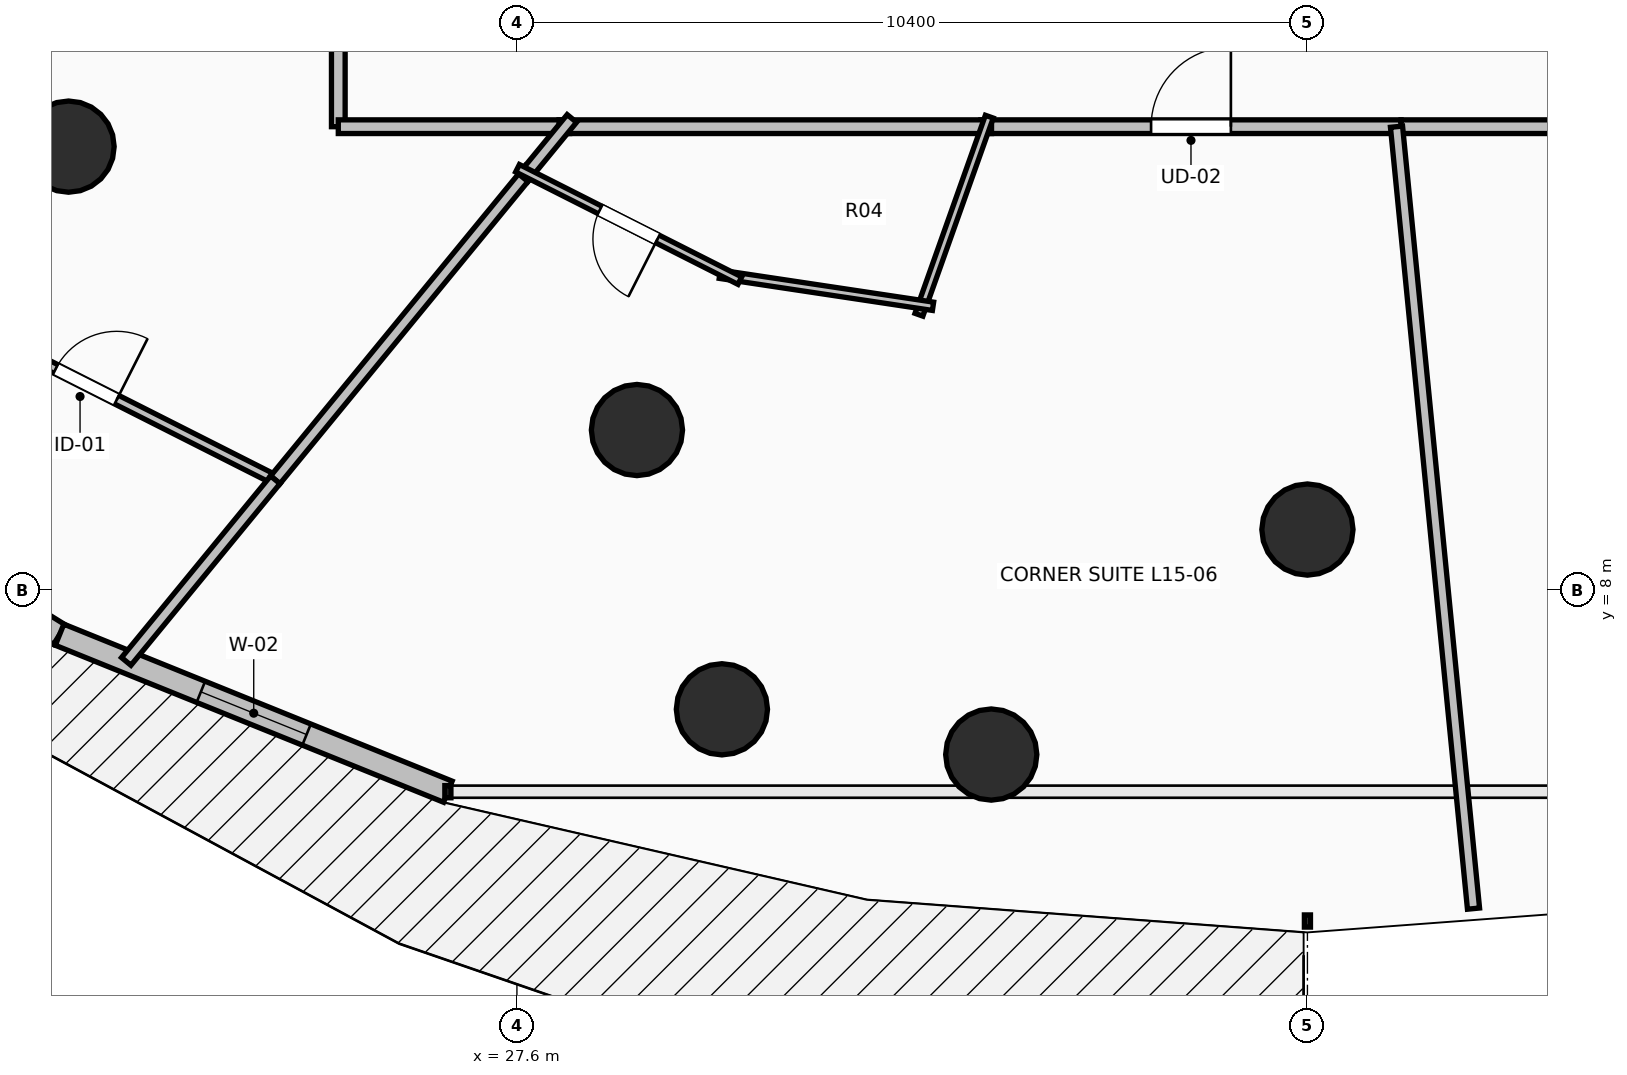
"""IFC4 building model, lengths in metres.
Left out: names, types, materials, properties, quantities, classifications, styles, units other than length and angle.
Written with IfcOpenShell. Run it as: python <this file> out.ifc"""

import sys

from ifc_helpers import new_model, si_unit, direction, frame, frame_2d, origin, origin_2d, place, context, subcontext, project, spatial, rectangle, circle, extrude, element, fill, save


model = new_model("IFC4")
c1 = context("Model", 3, precision=1e-05, world=origin(), true_north=direction((0.0, 1.0)))
c2 = subcontext(c1, "Body", "Model", "MODEL_VIEW")
j1 = project(units=[si_unit("LENGTHUNIT", "METRE"), si_unit("PLANEANGLEUNIT", "RADIAN")], contexts=[c1])
p1 = place(None, origin())
s1 = spatial("IfcSite", under=j1, at=p1, CompositionType="ELEMENT")
p2 = place(p1, origin())
s2 = spatial("IfcBuilding", under=s1, at=p2, CompositionType="ELEMENT")
p3 = place(p2, frame((0.0, 0.0, 59.0)))
s3 = spatial("IfcBuildingStorey", under=s2, at=p3, CompositionType="ELEMENT", Elevation=59.0)
for number, where, z_axis, x_axis in (
    (1, (21.701, 13.838, 0.0), (0.0, 0.0, 1.0), (-0.707, -0.707, 0.0)),
    (2, (29.179, 10.109, 0.0), (0.0, 0.0, 1.0), (-0.383, -0.924, 0.0)),
    (3, (38.0, 8.8, 0.0), (0.0, 0.0, 1.0), (0.0, -1.0, 0.0)),
    (4, (30.297, 6.435, 0.0), (0.0, 0.0, 1.0), (-0.383, -0.924, 0.0)),
    (5, (33.84, 5.84, 0.0), (0.0, 0.0, 1.0), (0.0, -1.0, 0.0)),
):
    element("IfcColumn", number, at=place(p3, frame(where, z_axis=z_axis, x_axis=x_axis)), inside=s3, PredefinedType="COLUMN", context=c2, shape_type="SweptSolid", body=[
        extrude(circle(Radius=0.6, at=origin_2d()), origin(), (0.0, 0.0, 1.0), 3.5),
    ])
p4 = place(p3, frame((17.105, 10.196, 0.0), z_axis=(0.0, 0.0, 1.0), x_axis=(0.849633724826, -0.527373239404, 0.0)))
e6 = element("IfcWall", 6, at=p4, inside=s3, PredefinedType="STANDARD", context=c2, shape_type="SweptSolid", body=[
    extrude(rectangle(XDim=5.271, YDim=0.3, at=frame_2d((2.635, 0.0))), origin(), (0.0, 0.0, 1.0), 3.24),
])
p5 = place(p4, frame((1.835, 0.0, 0.0)))
e7 = element("IfcOpeningElement", 7, at=p5, cuts=e6, PredefinedType="OPENING", context=c2, shape_type="SweptSolid", body=[
    extrude(rectangle(XDim=1.6, YDim=2.3, at=frame_2d((0.8, 1.15))), frame((0.0, 0.165, 0.0), z_axis=(0.0, -1.0, 0.0), x_axis=(1.0, 0.0, 0.0)), (0.0, 0.0, 1.0), 0.33),
])
p6 = place(p3, frame((21.583, 7.417, 0.0), z_axis=(0.0, 0.0, 1.0), x_axis=(0.927095325176, -0.374825636845, 0.0)))
e8 = element("IfcWall", 8, at=p6, inside=s3, PredefinedType="STANDARD", context=c2, shape_type="SweptSolid", body=[
    extrude(rectangle(XDim=5.51, YDim=0.3, at=frame_2d((2.755, 0.0))), origin(), (0.0, 0.0, 1.0), 3.24),
])
p7 = place(p6, frame((2.005, 0.0, 0.85)))
e9 = element("IfcOpeningElement", 9, at=p7, cuts=e8, PredefinedType="OPENING", context=c2, shape_type="SweptSolid", body=[
    extrude(rectangle(XDim=1.5, YDim=2.19, at=frame_2d((0.75, 1.095))), frame((0.0, 0.165, 0.0), z_axis=(0.0, -1.0, 0.0), x_axis=(1.0, 0.0, 0.0)), (0.0, 0.0, 1.0), 0.33),
])
p8 = place(p3, frame((25.25, 19.999, 0.0), z_axis=(0.0, 0.0, 1.0), x_axis=(0.0, -1.0, 0.0)))
e10 = element("IfcWall", 10, at=p8, inside=s3, PredefinedType="PARTITIONING", context=c2, shape_type="SweptSolid", body=[
    extrude(rectangle(XDim=5.899, YDim=0.18, at=frame_2d((2.949, 0.0))), origin(), (0.0, 0.0, 1.0), 2.432),
])
p9 = place(p8, frame((2.425, 0.0, 0.0)))
e11 = element("IfcOpeningElement", 11, at=p9, cuts=e10, PredefinedType="OPENING", context=c2, shape_type="SweptSolid", body=[
    extrude(rectangle(XDim=1.05, YDim=2.2, at=frame_2d((0.525, 1.1))), frame((0.0, 0.105, 0.0), z_axis=(0.0, -1.0, 0.0), x_axis=(1.0, 0.0, 0.0)), (0.0, 0.0, 1.0), 0.21),
])
p10 = place(p3, frame((25.25, 14.1, 0.0), z_axis=(0.0, 0.0, 1.0), x_axis=(1.0, 0.0, 0.0)))
e12 = element("IfcWall", 12, at=p10, inside=s3, PredefinedType="PARTITIONING", context=c2, shape_type="SweptSolid", body=[
    extrude(rectangle(XDim=3.044, YDim=0.18, at=frame_2d((1.522, 0.0))), origin(), (0.0, 0.0, 1.0), 2.432),
])
p11 = place(p3, frame((33.704, 14.1, 0.0), z_axis=(0.0, 0.0, 1.0), x_axis=(1.0, 0.0, 0.0)))
e13 = element("IfcWall", 13, at=p11, inside=s3, PredefinedType="PARTITIONING", context=c2, shape_type="SweptSolid", body=[
    extrude(rectangle(XDim=5.528, YDim=0.18, at=frame_2d((2.764, 0.0))), origin(), (0.0, 0.0, 1.0), 3.24),
])
p12 = place(p11, frame((2.239, 0.0, 0.0)))
e14 = element("IfcOpeningElement", 14, at=p12, cuts=e13, PredefinedType="OPENING", context=c2, shape_type="SweptSolid", body=[
    extrude(rectangle(XDim=1.05, YDim=2.2, at=frame_2d((0.525, 1.1))), frame((0.0, 0.105, 0.0), z_axis=(0.0, -1.0, 0.0), x_axis=(1.0, 0.0, 0.0)), (0.0, 0.0, 1.0), 0.21),
])
p13 = place(p3, frame((28.154, 14.1, 0.0), z_axis=(0.0, 0.0, 1.0), x_axis=(1.0, 0.0, 0.0)))
e15 = element("IfcWall", 15, at=p13, inside=s3, PredefinedType="PARTITIONING", context=c2, shape_type="SweptSolid", body=[
    extrude(rectangle(XDim=5.69, YDim=0.18, at=frame_2d((2.845, 0.0))), origin(), (0.0, 0.0, 1.0), 2.432),
])
p14 = place(p3, frame((39.232, 14.1, 0.0), z_axis=(0.0, 0.0, 1.0), x_axis=(1.0, 0.0, 0.0)))
e16 = element("IfcWall", 16, at=p14, inside=s3, PredefinedType="PARTITIONING", context=c2, shape_type="SweptSolid", body=[
    extrude(rectangle(XDim=2.968, YDim=0.18, at=frame_2d((1.484, 0.0))), origin(), (0.0, 0.0, 1.0), 3.24),
])
p15 = place(p3, frame((19.446, 11.968, 0.0), z_axis=(0.0, 0.0, 1.0), x_axis=(0.892518178955, -0.451011419184, 0.0)))
e17 = element("IfcWall", 17, at=p15, inside=s3, PredefinedType="PARTITIONING", context=c2, shape_type="SweptSolid", body=[
    extrude(rectangle(XDim=5.574, YDim=0.125, at=frame_2d((2.787, 0.0))), origin(), (0.0, 0.0, 1.0), 3.24),
])
p16 = place(p15, frame((2.337, 0.0, 0.0)))
e18 = element("IfcOpeningElement", 18, at=p16, cuts=e17, PredefinedType="OPENING", context=c2, shape_type="SweptSolid", body=[
    extrude(rectangle(XDim=0.9, YDim=2.1, at=frame_2d((0.45, 1.05))), frame((0.0, 0.077, 0.0), z_axis=(0.0, -1.0, 0.0), x_axis=(1.0, 0.0, 0.0)), (0.0, 0.0, 1.0), 0.155),
])
p17 = place(p3, frame((24.421, 9.454, 0.0), z_axis=(0.0, 0.0, 1.0), x_axis=(0.634420016008, 0.772988514332, 0.0)))
e19 = element("IfcWall", 19, at=p17, inside=s3, PredefinedType="PARTITIONING", context=c2, shape_type="SweptSolid", body=[
    extrude(rectangle(XDim=5.282, YDim=0.16, at=frame_2d((2.641, 0.0))), origin(), (0.0, 0.0, 1.0), 2.886),
])
p18 = place(p3, frame((27.683, 13.429, 0.0), z_axis=(0.0, 0.0, 1.0), x_axis=(0.634186727441, 0.77317992391, 0.0)))
e20 = element("IfcWall", 20, at=p18, inside=s3, PredefinedType="PARTITIONING", context=c2, shape_type="SweptSolid", body=[
    extrude(rectangle(XDim=1.008, YDim=0.16, at=frame_2d((0.504, 0.0))), origin(), (0.0, 0.0, 1.0), 2.432),
])
p19 = place(p3, frame((22.46, 7.065, 0.0), z_axis=(0.0, 0.0, 1.0), x_axis=(0.634432805544, 0.772978017313, 0.0)))
e21 = element("IfcWall", 21, at=p19, inside=s3, PredefinedType="PARTITIONING", context=c2, shape_type="SweptSolid", body=[
    extrude(rectangle(XDim=3.091, YDim=0.16, at=frame_2d((1.545, 0.0))), origin(), (0.0, 0.0, 1.0), 2.624),
])
p20 = place(p3, frame((33.815, 14.232, 0.0), z_axis=(0.0, 0.0, 1.0), x_axis=(-0.334786713612, -0.942293933117, 0.0)))
e22 = element("IfcWall", 22, at=p20, inside=s3, PredefinedType="PARTITIONING", context=c2, shape_type="SweptSolid", body=[
    extrude(rectangle(XDim=2.765, YDim=0.11, at=frame_2d((1.383, 0.0))), origin(), (0.0, 0.0, 1.0), 2.929),
])
p21 = place(p3, frame((33.074, 11.737, 0.0), z_axis=(0.0, 0.0, 1.0), x_axis=(-0.988902866222, 0.148563525729, 0.0)))
e23 = element("IfcWall", 23, at=p21, inside=s3, PredefinedType="PARTITIONING", context=c2, shape_type="SweptSolid", body=[
    extrude(rectangle(XDim=2.836, YDim=0.11, at=frame_2d((1.418, 0.0))), origin(), (0.0, 0.0, 1.0), 3.24),
])
p22 = place(p3, frame((30.533, 12.075, 0.0), z_axis=(0.0, 0.0, 1.0), x_axis=(-0.892451870397, 0.451142614952, 0.0)))
e24 = element("IfcWall", 24, at=p22, inside=s3, PredefinedType="PARTITIONING", context=c2, shape_type="SweptSolid", body=[
    extrude(rectangle(XDim=3.277, YDim=0.11, at=frame_2d((1.639, 0.0))), origin(), (0.0, 0.0, 1.0), 2.432),
])
p23 = place(p22, frame((1.214, 0.0, 0.0)))
e25 = element("IfcOpeningElement", 25, at=p23, cuts=e24, PredefinedType="OPENING", context=c2, shape_type="SweptSolid", body=[
    extrude(rectangle(XDim=0.85, YDim=2.1, at=frame_2d((0.425, 1.05))), frame((0.0, 0.07, 0.0), z_axis=(0.0, -1.0, 0.0), x_axis=(1.0, 0.0, 0.0)), (0.0, 0.0, 1.0), 0.14),
])
p24 = place(p3, frame((40.185, 3.813, 0.0), z_axis=(0.0, 0.0, 1.0), x_axis=(-0.097992958783, 0.99518710805, 0.0)))
e26 = element("IfcWall", 26, at=p24, inside=s3, PredefinedType="PARTITIONING", context=c2, shape_type="SweptSolid", body=[
    extrude(rectangle(XDim=10.337, YDim=0.16, at=frame_2d((5.168, 0.0))), origin(), (0.0, 0.0, 1.0), 2.432),
])
p25 = place(p7, origin())
e27 = element("IfcWindow", 27, at=p25, inside=s3, PartitioningType="SINGLE_PANEL", PredefinedType="WINDOW", context=c2, shape_type="SweptSolid", body=[
    extrude(rectangle(XDim=1.5, YDim=2.19, at=frame_2d((0.75, 1.095))), frame((0.0, 0.03, 0.0), z_axis=(0.0, -1.0, 0.0), x_axis=(1.0, 0.0, 0.0)), (0.0, 0.0, 1.0), 0.06),
])
fill(e9, e27)
p26 = place(p12, origin())
e28 = element("IfcDoor", 28, at=p26, inside=s3, OperationType="SINGLE_SWING_RIGHT", PredefinedType="DOOR", context=c2, shape_type="SweptSolid", body=[
    extrude(rectangle(XDim=1.05, YDim=2.2, at=frame_2d((0.525, 1.1))), frame((0.0, 0.025, 0.0), z_axis=(0.0, -1.0, 0.0), x_axis=(1.0, 0.0, 0.0)), (0.0, 0.0, 1.0), 0.05),
])
fill(e14, e28)
p27 = place(p16, origin())
e29 = element("IfcDoor", 29, at=p27, inside=s3, OperationType="SINGLE_SWING_RIGHT", PredefinedType="DOOR", context=c2, shape_type="SweptSolid", body=[
    extrude(rectangle(XDim=0.9, YDim=2.1, at=frame_2d((0.45, 1.05))), frame((0.0, 0.025, 0.0), z_axis=(0.0, -1.0, 0.0), x_axis=(1.0, 0.0, 0.0)), (0.0, 0.0, 1.0), 0.05),
])
fill(e18, e29)
p28 = place(p23, origin())
e30 = element("IfcDoor", 30, at=p28, inside=s3, OperationType="SINGLE_SWING_LEFT", PredefinedType="DOOR", context=c2, shape_type="SweptSolid", body=[
    extrude(rectangle(XDim=0.85, YDim=2.1, at=frame_2d((0.425, 1.05))), frame((0.0, 0.025, 0.0), z_axis=(0.0, -1.0, 0.0), x_axis=(1.0, 0.0, 0.0)), (0.0, 0.0, 1.0), 0.05),
])
fill(e25, e30)
save(model, sys.argv[1])
